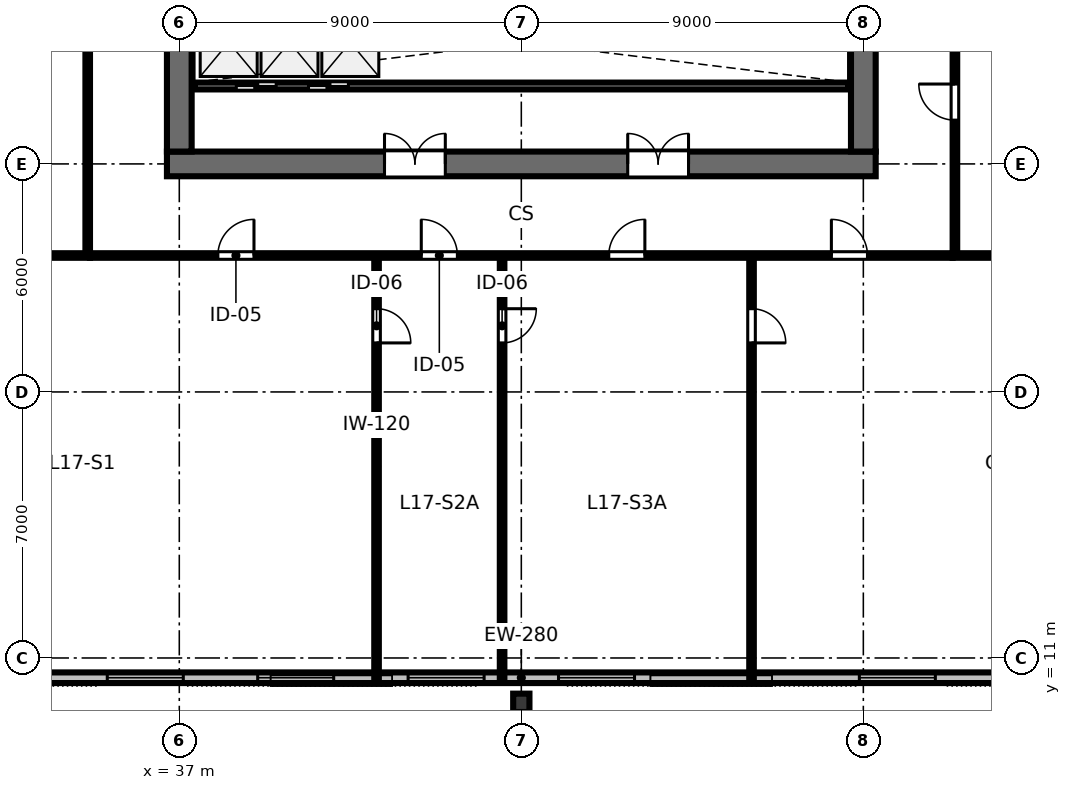
"""IFC4 building model, lengths in metres.
Left out: names, types, materials, properties, quantities, classifications, styles, units other than length and angle.
Written with IfcOpenShell. Run it as: python <this file> out.ifc"""

import sys

from ifc_helpers import new_model, si_unit, direction, frame, frame_2d, origin, origin_2d, place, context, subcontext, project, spatial, rectangle, i_section, extrude, element, fill, save


model = new_model("IFC4")
c1 = context("Model", 3, precision=1e-05, world=origin(), true_north=direction((0.0, 1.0)))
c2 = subcontext(c1, "Body", "Model", "MODEL_VIEW")
j1 = project(units=[si_unit("LENGTHUNIT", "METRE"), si_unit("PLANEANGLEUNIT", "RADIAN")], contexts=[c1])
p1 = place(None, origin())
s1 = spatial("IfcSite", under=j1, at=p1, CompositionType="ELEMENT")
p2 = place(p1, origin())
s2 = spatial("IfcBuilding", under=s1, at=p2, CompositionType="ELEMENT")
p3 = place(p2, frame((0.0, 0.0, 67.6)))
s3 = spatial("IfcBuildingStorey", under=s2, at=p3, CompositionType="ELEMENT", Elevation=67.6)
p4 = place(p3, frame((36.675, 24.0, 0.0), z_axis=(0.0, 0.0, 1.0), x_axis=(1.0, 0.0, 0.0)))
e1 = element("IfcWall", 1, at=p4, inside=s3, PredefinedType="SHEAR", context=c2, shape_type="SweptSolid", body=[
    extrude(rectangle(XDim=18.65, YDim=0.65, at=frame_2d((9.325, 0.0))), origin(), (0.0, 0.0, 1.0), 3.36),
])
p5 = place(p4, frame((5.725, 0.0, 0.0)))
e2 = element("IfcOpeningElement", 2, at=p5, cuts=e1, PredefinedType="OPENING", context=c2, shape_type="SweptSolid", body=[
    extrude(rectangle(XDim=1.6, YDim=2.15, at=frame_2d((0.8, 1.075))), frame((0.0, 0.335, 0.0), z_axis=(0.0, -1.0, 0.0), x_axis=(1.0, 0.0, 0.0)), (0.0, 0.0, 1.0), 0.67),
])
p6 = place(p4, frame((12.125, 0.0, 0.0)))
e3 = element("IfcOpeningElement", 3, at=p6, cuts=e1, PredefinedType="OPENING", context=c2, shape_type="SweptSolid", body=[
    extrude(rectangle(XDim=1.6, YDim=2.15, at=frame_2d((0.8, 1.075))), frame((0.0, 0.335, 0.0), z_axis=(0.0, -1.0, 0.0), x_axis=(1.0, 0.0, 0.0)), (0.0, 0.0, 1.0), 0.67),
])
p7 = place(p3, frame((37.0, 24.325, 0.0), z_axis=(0.0, 0.0, 1.0), x_axis=(0.0, 1.0, 0.0)))
e4 = element("IfcWall", 4, at=p7, inside=s3, PredefinedType="SHEAR", context=c2, shape_type="SweptSolid", body=[
    extrude(rectangle(XDim=15.35, YDim=0.65, at=frame_2d((7.675, 0.0))), origin(), (0.0, 0.0, 1.0), 3.36),
])
p8 = place(p7, frame((5.2, 0.0, 0.0)))
e5 = element("IfcOpeningElement", 5, at=p8, cuts=e4, PredefinedType="OPENING", context=c2, shape_type="SweptSolid", body=[
    extrude(rectangle(XDim=1.15, YDim=2.15, at=frame_2d((0.575, 1.075))), frame((0.0, 0.335, 0.0), z_axis=(0.0, -1.0, 0.0), x_axis=(1.0, 0.0, 0.0)), (0.0, 0.0, 1.0), 0.67),
])
p9 = place(p3, frame((55.0, 24.325, 0.0), z_axis=(0.0, 0.0, 1.0), x_axis=(0.0, 1.0, 0.0)))
e6 = element("IfcWall", 6, at=p9, inside=s3, PredefinedType="SHEAR", context=c2, shape_type="SweptSolid", body=[
    extrude(rectangle(XDim=15.35, YDim=0.65, at=frame_2d((7.675, 0.0))), origin(), (0.0, 0.0, 1.0), 3.36),
])
p10 = place(p9, frame((5.2, 0.0, 0.0)))
e7 = element("IfcOpeningElement", 7, at=p10, cuts=e6, PredefinedType="OPENING", context=c2, shape_type="SweptSolid", body=[
    extrude(rectangle(XDim=1.15, YDim=2.15, at=frame_2d((0.575, 1.075))), frame((0.0, 0.335, 0.0), z_axis=(0.0, -1.0, 0.0), x_axis=(1.0, 0.0, 0.0)), (0.0, 0.0, 1.0), 0.67),
])
p11 = place(p3, frame((46.0, 9.82, 0.0), z_axis=(0.0, -0.089001216718, 0.996031517284), x_axis=(1.0, 0.0, 0.0)))
e8 = element("IfcColumn", 8, at=p11, inside=s3, PredefinedType="COLUMN", context=c2, shape_type="SweptSolid", body=[
    extrude(i_section(OverallWidth=0.428, OverallDepth=0.483, WebThickness=0.051, FlangeThickness=0.082, FilletRadius=0.025, at=origin_2d()), origin(), (0.0, 0.0, 1.0), 3.371),
])
p12 = place(p3, frame((25.11, 10.48, 0.0), z_axis=(0.0, 0.0, 1.0), x_axis=(1.0, 0.0, 0.0)))
e9 = element("IfcWall", 9, at=p12, inside=s3, PredefinedType="STANDARD", context=c2, shape_type="SweptSolid", body=[
    extrude(rectangle(XDim=41.78, YDim=0.28, at=frame_2d((20.89, 0.0))), origin(), (0.0, 0.0, 1.0), 3.36),
])
p13 = place(p12, frame((2.079, 0.0, 0.8)))
e10 = element("IfcOpeningElement", 10, at=p13, cuts=e9, PredefinedType="OPENING", context=c2, shape_type="SweptSolid", body=[
    extrude(rectangle(XDim=2.0, YDim=1.95, at=frame_2d((1.0, 0.975))), frame((0.0, 0.15, 0.0), z_axis=(0.0, -1.0, 0.0), x_axis=(1.0, 0.0, 0.0)), (0.0, 0.0, 1.0), 0.3),
])
p14 = place(p12, frame((6.037, 0.0, 0.8)))
e11 = element("IfcOpeningElement", 11, at=p14, cuts=e9, PredefinedType="OPENING", context=c2, shape_type="SweptSolid", body=[
    extrude(rectangle(XDim=2.0, YDim=1.95, at=frame_2d((1.0, 0.975))), frame((0.0, 0.15, 0.0), z_axis=(0.0, -1.0, 0.0), x_axis=(1.0, 0.0, 0.0)), (0.0, 0.0, 1.0), 0.3),
])
p15 = place(p12, frame((9.995, 0.0, 0.8)))
e12 = element("IfcOpeningElement", 12, at=p15, cuts=e9, PredefinedType="OPENING", context=c2, shape_type="SweptSolid", body=[
    extrude(rectangle(XDim=2.0, YDim=1.95, at=frame_2d((1.0, 0.975))), frame((0.0, 0.15, 0.0), z_axis=(0.0, -1.0, 0.0), x_axis=(1.0, 0.0, 0.0)), (0.0, 0.0, 1.0), 0.3),
])
p16 = place(p12, frame((13.953, 0.0, 0.8)))
e13 = element("IfcOpeningElement", 13, at=p16, cuts=e9, PredefinedType="OPENING", context=c2, shape_type="SweptSolid", body=[
    extrude(rectangle(XDim=2.0, YDim=1.95, at=frame_2d((1.0, 0.975))), frame((0.0, 0.15, 0.0), z_axis=(0.0, -1.0, 0.0), x_axis=(1.0, 0.0, 0.0)), (0.0, 0.0, 1.0), 0.3),
])
p17 = place(p12, frame((17.911, 0.0, 0.8)))
e14 = element("IfcOpeningElement", 14, at=p17, cuts=e9, PredefinedType="OPENING", context=c2, shape_type="SweptSolid", body=[
    extrude(rectangle(XDim=2.0, YDim=1.95, at=frame_2d((1.0, 0.975))), frame((0.0, 0.15, 0.0), z_axis=(0.0, -1.0, 0.0), x_axis=(1.0, 0.0, 0.0)), (0.0, 0.0, 1.0), 0.3),
])
p18 = place(p12, frame((21.869, 0.0, 0.8)))
e15 = element("IfcOpeningElement", 15, at=p18, cuts=e9, PredefinedType="OPENING", context=c2, shape_type="SweptSolid", body=[
    extrude(rectangle(XDim=2.0, YDim=1.95, at=frame_2d((1.0, 0.975))), frame((0.0, 0.15, 0.0), z_axis=(0.0, -1.0, 0.0), x_axis=(1.0, 0.0, 0.0)), (0.0, 0.0, 1.0), 0.3),
])
p19 = place(p12, frame((29.785, 0.0, 0.8)))
e16 = element("IfcOpeningElement", 16, at=p19, cuts=e9, PredefinedType="OPENING", context=c2, shape_type="SweptSolid", body=[
    extrude(rectangle(XDim=2.0, YDim=1.95, at=frame_2d((1.0, 0.975))), frame((0.0, 0.15, 0.0), z_axis=(0.0, -1.0, 0.0), x_axis=(1.0, 0.0, 0.0)), (0.0, 0.0, 1.0), 0.3),
])
p20 = place(p12, frame((33.743, 0.0, 0.8)))
e17 = element("IfcOpeningElement", 17, at=p20, cuts=e9, PredefinedType="OPENING", context=c2, shape_type="SweptSolid", body=[
    extrude(rectangle(XDim=2.0, YDim=1.95, at=frame_2d((1.0, 0.975))), frame((0.0, 0.15, 0.0), z_axis=(0.0, -1.0, 0.0), x_axis=(1.0, 0.0, 0.0)), (0.0, 0.0, 1.0), 0.3),
])
p21 = place(p12, frame((37.701, 0.0, 0.8)))
e18 = element("IfcOpeningElement", 18, at=p21, cuts=e9, PredefinedType="OPENING", context=c2, shape_type="SweptSolid", body=[
    extrude(rectangle(XDim=2.0, YDim=1.95, at=frame_2d((1.0, 0.975))), frame((0.0, 0.15, 0.0), z_axis=(0.0, -1.0, 0.0), x_axis=(1.0, 0.0, 0.0)), (0.0, 0.0, 1.0), 0.3),
])
p22 = place(p3, frame((37.4, 26.05, 0.0), z_axis=(0.0, 0.0, 1.0), x_axis=(1.0, 0.0, 0.0)))
e19 = element("IfcWall", 19, at=p22, inside=s3, PredefinedType="PARTITIONING", context=c2, shape_type="SweptSolid", body=[
    extrude(rectangle(XDim=17.2, YDim=0.18, at=frame_2d((8.6, 0.0))), origin(), (0.0, 0.0, 1.0), 3.36),
])
p23 = place(p22, frame((1.1, 0.0, 0.0)))
e20 = element("IfcOpeningElement", 20, at=p23, cuts=e19, PredefinedType="OPENING", context=c2, shape_type="SweptSolid", body=[
    extrude(rectangle(XDim=1.05, YDim=2.15, at=frame_2d((0.525, 1.075))), frame((0.0, 0.1, 0.0), z_axis=(0.0, -1.0, 0.0), x_axis=(1.0, 0.0, 0.0)), (0.0, 0.0, 1.0), 0.2),
])
p24 = place(p22, frame((3.0, 0.0, 0.0)))
e21 = element("IfcOpeningElement", 21, at=p24, cuts=e19, PredefinedType="OPENING", context=c2, shape_type="SweptSolid", body=[
    extrude(rectangle(XDim=1.05, YDim=2.15, at=frame_2d((0.525, 1.075))), frame((0.0, 0.1, 0.0), z_axis=(0.0, -1.0, 0.0), x_axis=(1.0, 0.0, 0.0)), (0.0, 0.0, 1.0), 0.2),
])
p25 = place(p3, frame((42.191, 21.59, 0.0), z_axis=(0.0, 0.0, 1.0), x_axis=(0.0, -1.0, 0.0)))
e22 = element("IfcWall", 22, at=p25, inside=s3, PredefinedType="PARTITIONING", context=c2, shape_type="SweptSolid", body=[
    extrude(rectangle(XDim=11.11, YDim=0.12, at=frame_2d((5.555, 0.0))), origin(), (0.0, 0.0, 1.0), 2.64),
])
p26 = place(p25, frame((1.4, 0.0, 0.0)))
e23 = element("IfcOpeningElement", 23, at=p26, cuts=e22, PredefinedType="OPENING", context=c2, shape_type="SweptSolid", body=[
    extrude(rectangle(XDim=0.9, YDim=2.15, at=frame_2d((0.45, 1.075))), frame((0.0, 0.07, 0.0), z_axis=(0.0, -1.0, 0.0), x_axis=(1.0, 0.0, 0.0)), (0.0, 0.0, 1.0), 0.14),
])
p27 = place(p3, frame((45.494, 21.59, 0.0), z_axis=(0.0, 0.0, 1.0), x_axis=(0.0, -1.0, 0.0)))
e24 = element("IfcWall", 24, at=p27, inside=s3, PredefinedType="PARTITIONING", context=c2, shape_type="SweptSolid", body=[
    extrude(rectangle(XDim=11.11, YDim=0.12, at=frame_2d((5.555, 0.0))), origin(), (0.0, 0.0, 1.0), 2.64),
])
p28 = place(p27, frame((1.4, 0.0, 0.0)))
e25 = element("IfcOpeningElement", 25, at=p28, cuts=e24, PredefinedType="OPENING", context=c2, shape_type="SweptSolid", body=[
    extrude(rectangle(XDim=0.9, YDim=2.15, at=frame_2d((0.45, 1.075))), frame((0.0, 0.07, 0.0), z_axis=(0.0, -1.0, 0.0), x_axis=(1.0, 0.0, 0.0)), (0.0, 0.0, 1.0), 0.14),
])
p29 = place(p3, frame((52.058, 21.59, 0.0), z_axis=(0.0, 0.0, 1.0), x_axis=(0.0, -1.0, 0.0)))
e26 = element("IfcWall", 26, at=p29, inside=s3, PredefinedType="PARTITIONING", context=c2, shape_type="SweptSolid", body=[
    extrude(rectangle(XDim=11.11, YDim=0.12, at=frame_2d((5.555, 0.0))), origin(), (0.0, 0.0, 1.0), 2.64),
])
p30 = place(p29, frame((1.4, 0.0, 0.0)))
e27 = element("IfcOpeningElement", 27, at=p30, cuts=e26, PredefinedType="OPENING", context=c2, shape_type="SweptSolid", body=[
    extrude(rectangle(XDim=0.9, YDim=2.15, at=frame_2d((0.45, 1.075))), frame((0.0, 0.07, 0.0), z_axis=(0.0, -1.0, 0.0), x_axis=(1.0, 0.0, 0.0)), (0.0, 0.0, 1.0), 0.14),
])
p31 = place(p3, frame((34.65, 21.59, 0.0), z_axis=(0.0, 0.0, 1.0), x_axis=(1.0, 0.0, 0.0)))
e28 = element("IfcWall", 28, at=p31, inside=s3, PredefinedType="PARTITIONING", context=c2, shape_type="SweptSolid", body=[
    extrude(rectangle(XDim=22.7, YDim=0.12, at=frame_2d((11.35, 0.0))), origin(), (0.0, 0.0, 1.0), 2.64),
])
p32 = place(p31, frame((3.365, 0.0, 0.0)))
e29 = element("IfcOpeningElement", 29, at=p32, cuts=e28, PredefinedType="OPENING", context=c2, shape_type="SweptSolid", body=[
    extrude(rectangle(XDim=0.95, YDim=2.15, at=frame_2d((0.475, 1.075))), frame((0.0, 0.07, 0.0), z_axis=(0.0, -1.0, 0.0), x_axis=(1.0, 0.0, 0.0)), (0.0, 0.0, 1.0), 0.14),
])
p33 = place(p31, frame((8.718, 0.0, 0.0)))
e30 = element("IfcOpeningElement", 30, at=p33, cuts=e28, PredefinedType="OPENING", context=c2, shape_type="SweptSolid", body=[
    extrude(rectangle(XDim=0.95, YDim=2.15, at=frame_2d((0.475, 1.075))), frame((0.0, 0.07, 0.0), z_axis=(0.0, -1.0, 0.0), x_axis=(1.0, 0.0, 0.0)), (0.0, 0.0, 1.0), 0.14),
])
p34 = place(p31, frame((13.651, 0.0, 0.0)))
e31 = element("IfcOpeningElement", 31, at=p34, cuts=e28, PredefinedType="OPENING", context=c2, shape_type="SweptSolid", body=[
    extrude(rectangle(XDim=0.95, YDim=2.15, at=frame_2d((0.475, 1.075))), frame((0.0, 0.07, 0.0), z_axis=(0.0, -1.0, 0.0), x_axis=(1.0, 0.0, 0.0)), (0.0, 0.0, 1.0), 0.14),
])
p35 = place(p31, frame((19.509, 0.0, 0.0)))
e32 = element("IfcOpeningElement", 32, at=p35, cuts=e28, PredefinedType="OPENING", context=c2, shape_type="SweptSolid", body=[
    extrude(rectangle(XDim=0.95, YDim=2.15, at=frame_2d((0.475, 1.075))), frame((0.0, 0.07, 0.0), z_axis=(0.0, -1.0, 0.0), x_axis=(1.0, 0.0, 0.0)), (0.0, 0.0, 1.0), 0.14),
])
p36 = place(p3, frame((34.59, 21.65, 0.0), z_axis=(0.0, 0.0, 1.0), x_axis=(0.0, 1.0, 0.0)))
e33 = element("IfcWall", 33, at=p36, inside=s3, PredefinedType="PARTITIONING", context=c2, shape_type="SweptSolid", body=[
    extrude(rectangle(XDim=20.7, YDim=0.12, at=frame_2d((10.35, 0.0))), origin(), (0.0, 0.0, 1.0), 2.64),
])
p37 = place(p36, frame((6.696, 0.0, 0.0)))
e34 = element("IfcOpeningElement", 34, at=p37, cuts=e33, PredefinedType="OPENING", context=c2, shape_type="SweptSolid", body=[
    extrude(rectangle(XDim=0.95, YDim=2.15, at=frame_2d((0.475, 1.075))), frame((0.0, 0.07, 0.0), z_axis=(0.0, -1.0, 0.0), x_axis=(1.0, 0.0, 0.0)), (0.0, 0.0, 1.0), 0.14),
])
p38 = place(p36, frame((16.846, 0.0, 0.0)))
e35 = element("IfcOpeningElement", 35, at=p38, cuts=e33, PredefinedType="OPENING", context=c2, shape_type="SweptSolid", body=[
    extrude(rectangle(XDim=0.95, YDim=2.15, at=frame_2d((0.475, 1.075))), frame((0.0, 0.07, 0.0), z_axis=(0.0, -1.0, 0.0), x_axis=(1.0, 0.0, 0.0)), (0.0, 0.0, 1.0), 0.14),
])
p39 = place(p3, frame((57.41, 21.65, 0.0), z_axis=(0.0, 0.0, 1.0), x_axis=(0.0, 1.0, 0.0)))
e36 = element("IfcWall", 36, at=p39, inside=s3, PredefinedType="PARTITIONING", context=c2, shape_type="SweptSolid", body=[
    extrude(rectangle(XDim=20.7, YDim=0.12, at=frame_2d((10.35, 0.0))), origin(), (0.0, 0.0, 1.0), 2.64),
])
p40 = place(p39, frame((3.502, 0.0, 0.0)))
e37 = element("IfcOpeningElement", 37, at=p40, cuts=e36, PredefinedType="OPENING", context=c2, shape_type="SweptSolid", body=[
    extrude(rectangle(XDim=0.95, YDim=2.15, at=frame_2d((0.475, 1.075))), frame((0.0, 0.07, 0.0), z_axis=(0.0, -1.0, 0.0), x_axis=(1.0, 0.0, 0.0)), (0.0, 0.0, 1.0), 0.14),
])
p41 = place(p39, frame((13.652, 0.0, 0.0)))
e38 = element("IfcOpeningElement", 38, at=p41, cuts=e36, PredefinedType="OPENING", context=c2, shape_type="SweptSolid", body=[
    extrude(rectangle(XDim=0.95, YDim=2.15, at=frame_2d((0.475, 1.075))), frame((0.0, 0.07, 0.0), z_axis=(0.0, -1.0, 0.0), x_axis=(1.0, 0.0, 0.0)), (0.0, 0.0, 1.0), 0.14),
])
for number, where, z_axis, x_axis in (
    (39, (34.65, 21.59, 0.0), (0.0, 0.0, 1.0), (-1.0, 0.0, 0.0)),
    (40, (57.35, 21.59, 0.0), (0.0, 0.0, 1.0), (1.0, 0.0, 0.0)),
):
    element("IfcWall", number, at=place(p3, frame(where, z_axis=z_axis, x_axis=x_axis)), inside=s3, PredefinedType="PARTITIONING", context=c2, shape_type="SweptSolid", body=[
        extrude(rectangle(XDim=13.12, YDim=0.12, at=frame_2d((6.56, 0.0))), origin(), (0.0, 0.0, 1.0), 2.64),
    ])
p42 = place(p15, origin())
e41 = element("IfcWindow", 41, at=p42, inside=s3, PartitioningType="SINGLE_PANEL", PredefinedType="WINDOW", context=c2, shape_type="SweptSolid", body=[
    extrude(rectangle(XDim=2.0, YDim=1.95, at=frame_2d((1.0, 0.975))), frame((0.0, 0.03, 0.0), z_axis=(0.0, -1.0, 0.0), x_axis=(1.0, 0.0, 0.0)), (0.0, 0.0, 1.0), 0.06),
])
fill(e12, e41)
p43 = place(p16, origin())
e42 = element("IfcWindow", 42, at=p43, inside=s3, PartitioningType="SINGLE_PANEL", PredefinedType="WINDOW", context=c2, shape_type="SweptSolid", body=[
    extrude(rectangle(XDim=2.0, YDim=1.95, at=frame_2d((1.0, 0.975))), frame((0.0, 0.03, 0.0), z_axis=(0.0, -1.0, 0.0), x_axis=(1.0, 0.0, 0.0)), (0.0, 0.0, 1.0), 0.06),
])
fill(e13, e42)
p44 = place(p17, origin())
e43 = element("IfcWindow", 43, at=p44, inside=s3, PartitioningType="SINGLE_PANEL", PredefinedType="WINDOW", context=c2, shape_type="SweptSolid", body=[
    extrude(rectangle(XDim=2.0, YDim=1.95, at=frame_2d((1.0, 0.975))), frame((0.0, 0.03, 0.0), z_axis=(0.0, -1.0, 0.0), x_axis=(1.0, 0.0, 0.0)), (0.0, 0.0, 1.0), 0.06),
])
fill(e14, e43)
p45 = place(p18, origin())
e44 = element("IfcWindow", 44, at=p45, inside=s3, PartitioningType="SINGLE_PANEL", PredefinedType="WINDOW", context=c2, shape_type="SweptSolid", body=[
    extrude(rectangle(XDim=2.0, YDim=1.95, at=frame_2d((1.0, 0.975))), frame((0.0, 0.03, 0.0), z_axis=(0.0, -1.0, 0.0), x_axis=(1.0, 0.0, 0.0)), (0.0, 0.0, 1.0), 0.06),
])
fill(e15, e44)
p46 = place(p19, origin())
e45 = element("IfcWindow", 45, at=p46, inside=s3, PartitioningType="SINGLE_PANEL", PredefinedType="WINDOW", context=c2, shape_type="SweptSolid", body=[
    extrude(rectangle(XDim=2.0, YDim=1.95, at=frame_2d((1.0, 0.975))), frame((0.0, 0.03, 0.0), z_axis=(0.0, -1.0, 0.0), x_axis=(1.0, 0.0, 0.0)), (0.0, 0.0, 1.0), 0.06),
])
fill(e16, e45)
p47 = place(p5, origin())
e46 = element("IfcDoor", 46, at=p47, inside=s3, OperationType="DOUBLE_DOOR_SINGLE_SWING", PredefinedType="DOOR", context=c2, shape_type="SweptSolid", body=[
    extrude(rectangle(XDim=1.6, YDim=2.15, at=frame_2d((0.8, 1.075))), frame((0.0, 0.025, 0.0), z_axis=(0.0, -1.0, 0.0), x_axis=(1.0, 0.0, 0.0)), (0.0, 0.0, 1.0), 0.05),
])
fill(e2, e46)
p48 = place(p6, origin())
e47 = element("IfcDoor", 47, at=p48, inside=s3, OperationType="DOUBLE_DOOR_SINGLE_SWING", PredefinedType="DOOR", context=c2, shape_type="SweptSolid", body=[
    extrude(rectangle(XDim=1.6, YDim=2.15, at=frame_2d((0.8, 1.075))), frame((0.0, 0.025, 0.0), z_axis=(0.0, -1.0, 0.0), x_axis=(1.0, 0.0, 0.0)), (0.0, 0.0, 1.0), 0.05),
])
fill(e3, e47)
p49 = place(p23, origin())
e48 = element("IfcDoor", 48, at=p49, inside=s3, OperationType="SLIDING_TO_LEFT", PredefinedType="DOOR", context=c2, shape_type="SweptSolid", body=[
    extrude(rectangle(XDim=1.05, YDim=2.15, at=frame_2d((0.525, 1.075))), frame((0.0, 0.025, 0.0), z_axis=(0.0, -1.0, 0.0), x_axis=(1.0, 0.0, 0.0)), (0.0, 0.0, 1.0), 0.05),
])
fill(e20, e48)
p50 = place(p24, origin())
e49 = element("IfcDoor", 49, at=p50, inside=s3, OperationType="SLIDING_TO_RIGHT", PredefinedType="DOOR", context=c2, shape_type="SweptSolid", body=[
    extrude(rectangle(XDim=1.05, YDim=2.15, at=frame_2d((0.525, 1.075))), frame((0.0, 0.025, 0.0), z_axis=(0.0, -1.0, 0.0), x_axis=(1.0, 0.0, 0.0)), (0.0, 0.0, 1.0), 0.05),
])
fill(e21, e49)
p51 = place(p26, origin())
e50 = element("IfcDoor", 50, at=p51, inside=s3, OperationType="SINGLE_SWING_RIGHT", PredefinedType="DOOR", context=c2, shape_type="SweptSolid", body=[
    extrude(rectangle(XDim=0.9, YDim=2.15, at=frame_2d((0.45, 1.075))), frame((0.0, 0.025, 0.0), z_axis=(0.0, -1.0, 0.0), x_axis=(1.0, 0.0, 0.0)), (0.0, 0.0, 1.0), 0.05),
])
fill(e23, e50)
p52 = place(p28, origin())
e51 = element("IfcDoor", 51, at=p52, inside=s3, OperationType="SINGLE_SWING_LEFT", PredefinedType="DOOR", context=c2, shape_type="SweptSolid", body=[
    extrude(rectangle(XDim=0.9, YDim=2.15, at=frame_2d((0.45, 1.075))), frame((0.0, 0.025, 0.0), z_axis=(0.0, -1.0, 0.0), x_axis=(1.0, 0.0, 0.0)), (0.0, 0.0, 1.0), 0.05),
])
fill(e25, e51)
p53 = place(p30, origin())
e52 = element("IfcDoor", 52, at=p53, inside=s3, OperationType="SINGLE_SWING_RIGHT", PredefinedType="DOOR", context=c2, shape_type="SweptSolid", body=[
    extrude(rectangle(XDim=0.9, YDim=2.15, at=frame_2d((0.45, 1.075))), frame((0.0, 0.025, 0.0), z_axis=(0.0, -1.0, 0.0), x_axis=(1.0, 0.0, 0.0)), (0.0, 0.0, 1.0), 0.05),
])
fill(e27, e52)
p54 = place(p32, origin())
e53 = element("IfcDoor", 53, at=p54, inside=s3, OperationType="SINGLE_SWING_RIGHT", PredefinedType="DOOR", context=c2, shape_type="SweptSolid", body=[
    extrude(rectangle(XDim=0.95, YDim=2.15, at=frame_2d((0.475, 1.075))), frame((0.0, 0.025, 0.0), z_axis=(0.0, -1.0, 0.0), x_axis=(1.0, 0.0, 0.0)), (0.0, 0.0, 1.0), 0.05),
])
fill(e29, e53)
p55 = place(p33, origin())
e54 = element("IfcDoor", 54, at=p55, inside=s3, OperationType="SINGLE_SWING_LEFT", PredefinedType="DOOR", context=c2, shape_type="SweptSolid", body=[
    extrude(rectangle(XDim=0.95, YDim=2.15, at=frame_2d((0.475, 1.075))), frame((0.0, 0.025, 0.0), z_axis=(0.0, -1.0, 0.0), x_axis=(1.0, 0.0, 0.0)), (0.0, 0.0, 1.0), 0.05),
])
fill(e30, e54)
p56 = place(p34, origin())
e55 = element("IfcDoor", 55, at=p56, inside=s3, OperationType="SINGLE_SWING_RIGHT", PredefinedType="DOOR", context=c2, shape_type="SweptSolid", body=[
    extrude(rectangle(XDim=0.95, YDim=2.15, at=frame_2d((0.475, 1.075))), frame((0.0, 0.025, 0.0), z_axis=(0.0, -1.0, 0.0), x_axis=(1.0, 0.0, 0.0)), (0.0, 0.0, 1.0), 0.05),
])
fill(e31, e55)
p57 = place(p35, origin())
e56 = element("IfcDoor", 56, at=p57, inside=s3, OperationType="SINGLE_SWING_LEFT", PredefinedType="DOOR", context=c2, shape_type="SweptSolid", body=[
    extrude(rectangle(XDim=0.95, YDim=2.15, at=frame_2d((0.475, 1.075))), frame((0.0, 0.025, 0.0), z_axis=(0.0, -1.0, 0.0), x_axis=(1.0, 0.0, 0.0)), (0.0, 0.0, 1.0), 0.05),
])
fill(e32, e56)
p58 = place(p40, origin())
e57 = element("IfcDoor", 57, at=p58, inside=s3, OperationType="SINGLE_SWING_RIGHT", PredefinedType="DOOR", context=c2, shape_type="SweptSolid", body=[
    extrude(rectangle(XDim=0.95, YDim=2.15, at=frame_2d((0.475, 1.075))), frame((0.0, 0.025, 0.0), z_axis=(0.0, -1.0, 0.0), x_axis=(1.0, 0.0, 0.0)), (0.0, 0.0, 1.0), 0.05),
])
fill(e37, e57)
save(model, sys.argv[1])
